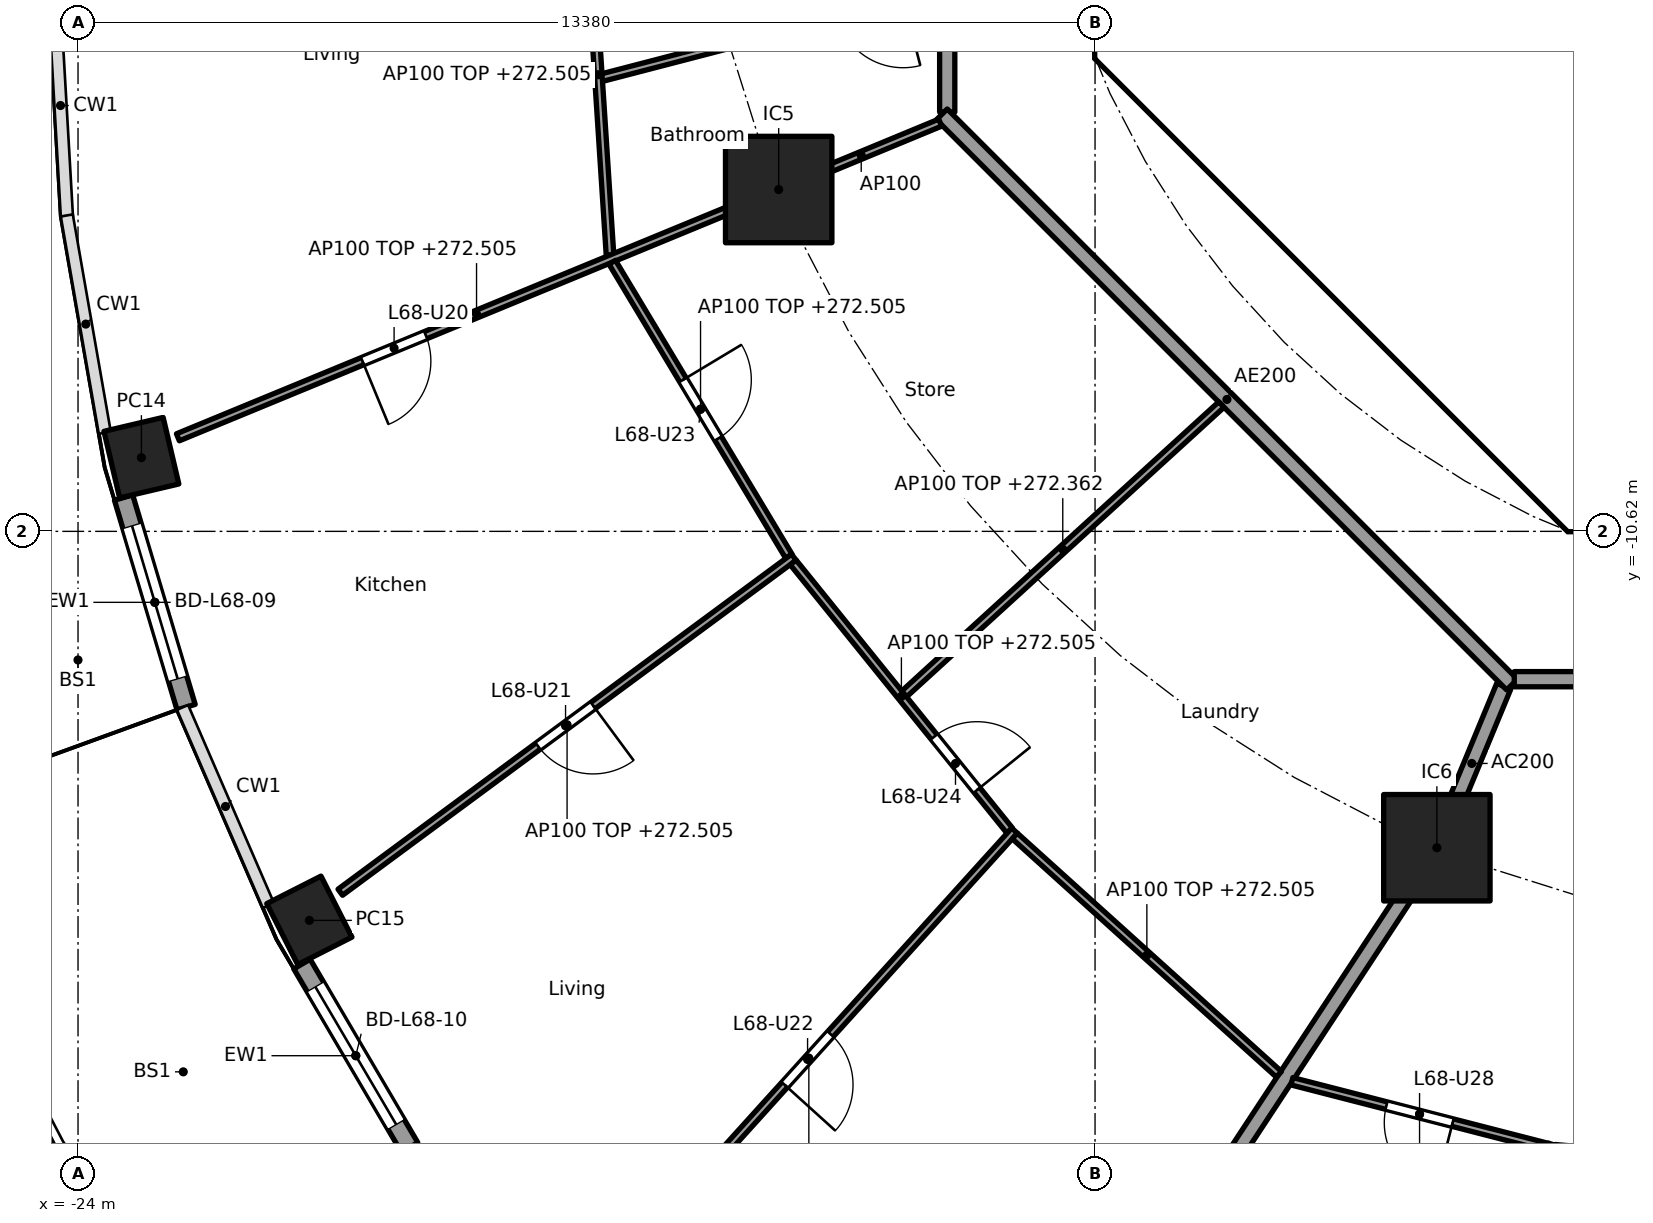
"""IFC4 building model, lengths in metres.
Left out: names, types, materials, properties, quantities, classifications, styles, units other than length and angle.
Written with IfcOpenShell. Run it as: python <this file> out.ifc"""

import sys

from ifc_helpers import new_model, si_unit, direction, frame, frame_2d, origin, origin_2d, place, context, subcontext, project, spatial, polyline, rectangle, hollow_rectangle, outline, extrude, element, fill, save


model = new_model("IFC4")
c1 = context("Model", 3, precision=1e-05, world=origin(), true_north=direction((0.0, 1.0)))
c2 = subcontext(c1, "Body", "Model", "MODEL_VIEW")
j1 = project(units=[si_unit("LENGTHUNIT", "METRE"), si_unit("PLANEANGLEUNIT", "RADIAN")], contexts=[c1])
p1 = place(None, origin())
s1 = spatial("IfcSite", under=j1, at=p1, CompositionType="ELEMENT")
p2 = place(p1, origin())
s2 = spatial("IfcBuilding", under=s1, at=p2, CompositionType="ELEMENT")
p3 = place(p2, frame((0.0, 0.0, 269.6)))
s3 = spatial("IfcBuildingStorey", under=s2, at=p3, CompositionType="ELEMENT", Elevation=269.6)
for number, where, z_axis, x_axis in (
    (1, (-23.166, -9.65, 0.0), (0.0, 0.0, 1.0), (0.229, -0.973, 0.0)),
    (2, (-20.957, -15.738, 0.0), (0.0, 0.0, 1.0), (0.452, -0.892, 0.0)),
):
    element("IfcColumn", number, at=place(p3, frame(where, z_axis=z_axis, x_axis=x_axis)), inside=s3, PredefinedType="COLUMN", context=c2, shape_type="SweptSolid", body=[
        extrude(hollow_rectangle(XDim=0.9, YDim=0.8, WallThickness=0.028, at=origin_2d()), origin(), (0.0, 0.0, 1.0), 3.7),
    ])
for number, where, z_axis, x_axis in (
    (3, (-14.782, -6.123, 0.0), (0.0, 0.0, 1.0), (1.0, 0.0, 0.0)),
    (4, (-6.123, -14.782, 0.0), (0.0, 0.0, 1.0), (1.0, 0.0, 0.0)),
):
    element("IfcColumn", number, at=place(p3, frame(where, z_axis=z_axis, x_axis=x_axis)), inside=s3, PredefinedType="COLUMN", context=c2, shape_type="SweptSolid", body=[
        extrude(rectangle(XDim=1.4, YDim=1.4, at=origin_2d()), origin(), (0.0, 0.0, 1.0), 3.7),
    ])
p4 = place(p3, frame((-22.578, -12.932, 0.0), z_axis=(0.0, 0.0, 1.0), x_axis=(-0.285899456462, 0.958259620768, 0.0)))
e5 = element("IfcWall", 5, at=p4, inside=s3, PredefinedType="SOLIDWALL", context=c2, shape_type="SweptSolid", body=[
    extrude(rectangle(XDim=2.877, YDim=0.25, at=frame_2d((1.438, 0.0))), origin(), (0.0, 0.0, 1.0), 3.44),
])
p5 = place(p4, frame((0.389, 0.0, 0.0)))
e6 = element("IfcOpeningElement", 6, at=p5, cuts=e5, PredefinedType="OPENING", context=c2, shape_type="SweptSolid", body=[
    extrude(rectangle(XDim=2.1, YDim=2.4, at=frame_2d((1.05, 1.2))), frame((0.0, 0.135, 0.0), z_axis=(0.0, -1.0, 0.0), x_axis=(1.0, 0.0, 0.0)), (0.0, 0.0, 1.0), 0.27),
])
p6 = place(p3, frame((-19.638, -18.724, 0.0), z_axis=(0.0, 0.0, 1.0), x_axis=(-0.506371364425, 0.862315511452, 0.0)))
e7 = element("IfcWall", 7, at=p6, inside=s3, PredefinedType="SOLIDWALL", context=c2, shape_type="SweptSolid", body=[
    extrude(rectangle(XDim=2.796, YDim=0.25, at=frame_2d((1.398, 0.0))), origin(), (0.0, 0.0, 1.0), 3.44),
])
p7 = place(p6, frame((0.348, 0.0, 0.0)))
e8 = element("IfcOpeningElement", 8, at=p7, cuts=e7, PredefinedType="OPENING", context=c2, shape_type="SweptSolid", body=[
    extrude(rectangle(XDim=2.1, YDim=2.4, at=frame_2d((1.05, 1.2))), frame((0.0, 0.135, 0.0), z_axis=(0.0, -1.0, 0.0), x_axis=(1.0, 0.0, 0.0)), (0.0, 0.0, 1.0), 0.27),
])
p8 = place(p3, frame((-9.988, -4.613, 0.0), z_axis=(0.0, 0.0, 1.0), x_axis=(0.707106781187, -0.707106781187, 0.0)))
e9 = element("IfcWall", 9, at=p8, inside=s3, PredefinedType="SHEAR", context=c2, shape_type="SweptSolid", body=[
    extrude(rectangle(XDim=7.602, YDim=0.6, at=frame_2d((3.801, 0.0))), origin(), (0.0, 0.0, 1.0), 3.44),
])
p9 = place(p8, frame((6.151, 0.0, 0.0)))
e10 = element("IfcOpeningElement", 10, at=p9, cuts=e9, PredefinedType="OPENING", context=c2, shape_type="SweptSolid", body=[
    extrude(rectangle(XDim=1.1, YDim=2.1, at=frame_2d((0.55, 1.05))), frame((0.0, 0.31, 0.0), z_axis=(0.0, -1.0, 0.0), x_axis=(1.0, 0.0, 0.0)), (0.0, 0.0, 1.0), 0.62),
])
p10 = place(p3, frame((-5.8, -8.227, 0.0), z_axis=(0.0, 0.0, 1.0), x_axis=(0.0, 1.0, 0.0)))
e11 = element("IfcWall", 11, at=p10, inside=s3, PredefinedType="PARTITIONING", context=c2, shape_type="SweptSolid", body=[
    extrude(rectangle(XDim=3.927, YDim=0.15, at=frame_2d((1.963, 0.0))), origin(), (0.0, 0.0, 1.0), 3.44),
])
p11 = place(p10, frame((2.615, 0.0, 0.0)))
e12 = element("IfcOpeningElement", 12, at=p11, cuts=e11, PredefinedType="OPENING", context=c2, shape_type="SweptSolid", body=[
    extrude(rectangle(XDim=0.9, YDim=2.1, at=frame_2d((0.45, 1.05))), frame((0.0, 0.085, 0.0), z_axis=(0.0, -1.0, 0.0), x_axis=(1.0, 0.0, 0.0)), (0.0, 0.0, 1.0), 0.17),
])
p12 = place(p10, frame((0.539, 0.0, 0.0)))
e13 = element("IfcOpeningElement", 13, at=p12, cuts=e11, PredefinedType="OPENING", context=c2, shape_type="SweptSolid", body=[
    extrude(rectangle(XDim=0.9, YDim=2.1, at=frame_2d((0.45, 1.05))), frame((0.0, 0.085, 0.0), z_axis=(0.0, -1.0, 0.0), x_axis=(1.0, 0.0, 0.0)), (0.0, 0.0, 1.0), 0.17),
])
p13 = place(p3, origin())
e14 = element("IfcWall", 14, at=p13, inside=s3, PredefinedType="SHEAR", context=c2, shape_type="SweptSolid", body=[
    extrude(outline(polyline([(-10.625, -3.801), (-10.025, -3.801), (-10.025, -4.152), (-9.776, -4.401), (-10.2, -4.825), (-10.625, -4.401), (-10.625, -3.801)])), origin(), (0.0, 0.0, 1.0), 3.44),
])
p14 = place(p3, origin())
e15 = element("IfcWall", 15, at=p14, inside=s3, PredefinedType="SHEAR", context=c2, shape_type="SweptSolid", body=[
    extrude(outline(polyline([(-4.152, -10.025), (4.152, -10.025), (4.401, -9.776), (4.825, -10.2), (4.401, -10.625), (-4.401, -10.625), (-4.825, -10.2), (-4.401, -9.776), (-4.152, -10.025)])), origin(), (0.0, 0.0, 1.0), 3.44),
])
p15 = place(p3, frame((-8.001, -6.1, 0.0), z_axis=(0.0, 0.0, 1.0), x_axis=(1.0, 0.0, 0.0)))
e16 = element("IfcWall", 16, at=p15, inside=s3, PredefinedType="PARTITIONING", context=c2, shape_type="SweptSolid", body=[
    extrude(rectangle(XDim=2.126, YDim=0.15, at=frame_2d((1.063, 0.0))), origin(), (0.0, 0.0, 1.0), 3.44),
])
p16 = place(p3, frame((-5.243, -12.657, 0.0), z_axis=(0.0, 0.0, 1.0), x_axis=(-0.382770106157, -0.923843626288, 0.0)))
e17 = element("IfcWall", 17, at=p16, inside=s3, PredefinedType="PARTITIONING", context=c2, shape_type="SweptSolid", body=[
    extrude(rectangle(XDim=2.199, YDim=0.2, at=frame_2d((1.1, 0.0))), origin(), (0.0, 0.0, 1.0), 3.44),
])
p17 = place(p3, frame((-6.151, -14.824, 0.0), z_axis=(0.0, 0.0, 1.0), x_axis=(-0.549345577828, -0.835595258556, 0.0)))
e18 = element("IfcWall", 18, at=p17, inside=s3, PredefinedType="PARTITIONING", context=c2, shape_type="SweptSolid", body=[
    extrude(rectangle(XDim=11.62, YDim=0.2, at=frame_2d((5.81, 0.0))), origin(), (0.0, 0.0, 1.0), 2.905),
])
p18 = place(p3, frame((-12.565, 5.304, 0.0), z_axis=(0.0, 0.0, 1.0), x_axis=(0.0, -1.0, 0.0)))
e19 = element("IfcWall", 19, at=p18, inside=s3, PredefinedType="PARTITIONING", context=c2, shape_type="SweptSolid", body=[
    extrude(rectangle(XDim=10.409, YDim=0.2, at=frame_2d((5.205, 0.0))), origin(), (0.0, 0.0, 1.0), 3.44),
])
p19 = place(p18, frame((6.539, 0.0, 0.0)))
e20 = element("IfcOpeningElement", 20, at=p19, cuts=e19, PredefinedType="OPENING", context=c2, shape_type="SweptSolid", body=[
    extrude(rectangle(XDim=1.0, YDim=2.1, at=frame_2d((0.5, 1.05))), frame((0.0, 0.11, 0.0), z_axis=(0.0, -1.0, 0.0), x_axis=(1.0, 0.0, 0.0)), (0.0, 0.0, 1.0), 0.22),
])
p20 = place(p3, frame((-12.635, -5.134, 0.0), z_axis=(0.0, 0.0, 1.0), x_axis=(0.707106781187, -0.707106781187, 0.0)))
e21 = element("IfcWall", 21, at=p20, inside=s3, PredefinedType="PARTITIONING", context=c2, shape_type="SweptSolid", body=[
    extrude(rectangle(XDim=10.609, YDim=0.2, at=frame_2d((5.305, 0.0))), origin(), (0.0, 0.0, 1.0), 3.44),
])
p21 = place(p3, frame((-5.104, -12.565, 0.0), z_axis=(0.0, 0.0, 1.0), x_axis=(1.0, 0.0, 0.0)))
e22 = element("IfcWall", 22, at=p21, inside=s3, PredefinedType="PARTITIONING", context=c2, shape_type="SweptSolid", body=[
    extrude(rectangle(XDim=10.409, YDim=0.2, at=frame_2d((5.205, 0.0))), origin(), (0.0, 0.0, 1.0), 3.44),
])
p22 = place(p21, frame((5.906, 0.0, 0.0)))
e23 = element("IfcOpeningElement", 23, at=p22, cuts=e22, PredefinedType="OPENING", context=c2, shape_type="SweptSolid", body=[
    extrude(rectangle(XDim=1.0, YDim=2.1, at=frame_2d((0.5, 1.05))), frame((0.0, 0.11, 0.0), z_axis=(0.0, -1.0, 0.0), x_axis=(1.0, 0.0, 0.0)), (0.0, 0.0, 1.0), 0.22),
])
p23 = place(p3, frame((-17.31, -2.238, 0.0), z_axis=(0.0, 0.0, 1.0), x_axis=(0.064949202176, -0.997888571503, 0.0)))
e24 = element("IfcWall", 24, at=p23, inside=s3, PredefinedType="PARTITIONING", context=c2, shape_type="SweptSolid", body=[
    extrude(rectangle(XDim=4.759, YDim=0.1, at=frame_2d((2.379, 0.0))), origin(), (0.0, 0.0, 1.0), 2.905),
])
p24 = place(p23, frame((0.79, 0.0, 0.0)))
e25 = element("IfcOpeningElement", 25, at=p24, cuts=e24, PredefinedType="OPENING", context=c2, shape_type="SweptSolid", body=[
    extrude(rectangle(XDim=0.9, YDim=2.1, at=frame_2d((0.45, 1.05))), frame((0.0, 0.06, 0.0), z_axis=(0.0, -1.0, 0.0), x_axis=(1.0, 0.0, 0.0)), (0.0, 0.0, 1.0), 0.12),
])
p25 = place(p3, frame((-12.662, -3.495, 0.0), z_axis=(0.0, 0.0, 1.0), x_axis=(-0.967834941053, -0.251586022817, 0.0)))
e26 = element("IfcWall", 26, at=p25, inside=s3, PredefinedType="PARTITIONING", context=c2, shape_type="SweptSolid", body=[
    extrude(rectangle(XDim=4.59, YDim=0.1, at=frame_2d((2.295, 0.0))), origin(), (0.0, 0.0, 1.0), 2.762),
])
p26 = place(p25, frame((0.5, 0.0, 0.0)))
e27 = element("IfcOpeningElement", 27, at=p26, cuts=e26, PredefinedType="OPENING", context=c2, shape_type="SweptSolid", body=[
    extrude(rectangle(XDim=0.9, YDim=2.1, at=frame_2d((0.45, 1.05))), frame((0.0, 0.06, 0.0), z_axis=(0.0, -1.0, 0.0), x_axis=(1.0, 0.0, 0.0)), (0.0, 0.0, 1.0), 0.12),
])
p27 = place(p3, frame((-12.657, -5.243, 0.0), z_axis=(0.0, 0.0, 1.0), x_axis=(-0.923871314276, -0.382703272338, 0.0)))
e28 = element("IfcWall", 28, at=p27, inside=s3, PredefinedType="PARTITIONING", context=c2, shape_type="SweptSolid", body=[
    extrude(rectangle(XDim=2.249, YDim=0.1, at=frame_2d((1.125, 0.0))), origin(), (0.0, 0.0, 1.0), 3.44),
])
p28 = place(p3, frame((-14.828, -6.142, 0.0), z_axis=(0.0, 0.0, 1.0), x_axis=(-0.924478087429, -0.381235184451, 0.0)))
e29 = element("IfcWall", 29, at=p28, inside=s3, PredefinedType="PARTITIONING", context=c2, shape_type="SweptSolid", body=[
    extrude(rectangle(XDim=8.499, YDim=0.1, at=frame_2d((4.25, 0.0))), origin(), (0.0, 0.0, 1.0), 2.905),
])
p29 = place(p28, frame((4.973, 0.0, 0.0)))
e30 = element("IfcOpeningElement", 30, at=p29, cuts=e29, PredefinedType="OPENING", context=c2, shape_type="SweptSolid", body=[
    extrude(rectangle(XDim=0.9, YDim=2.1, at=frame_2d((0.45, 1.05))), frame((0.0, 0.06, 0.0), z_axis=(0.0, -1.0, 0.0), x_axis=(1.0, 0.0, 0.0)), (0.0, 0.0, 1.0), 0.12),
])
p30 = place(p3, frame((-16.972, -7.08, 0.0), z_axis=(0.0, 0.0, 1.0), x_axis=(0.514989049311, -0.857196756346, 0.0)))
e31 = element("IfcWall", 31, at=p30, inside=s3, PredefinedType="PARTITIONING", context=c2, shape_type="SweptSolid", body=[
    extrude(rectangle(XDim=4.512, YDim=0.1, at=frame_2d((2.256, 0.0))), origin(), (0.0, 0.0, 1.0), 2.905),
])
p31 = place(p30, frame((1.806, 0.0, 0.0)))
e32 = element("IfcOpeningElement", 32, at=p31, cuts=e31, PredefinedType="OPENING", context=c2, shape_type="SweptSolid", body=[
    extrude(rectangle(XDim=0.9, YDim=2.1, at=frame_2d((0.45, 1.05))), frame((0.0, 0.06, 0.0), z_axis=(0.0, -1.0, 0.0), x_axis=(1.0, 0.0, 0.0)), (0.0, 0.0, 1.0), 0.12),
])
p32 = place(p3, frame((-14.582, -10.96, 0.0), z_axis=(0.0, 0.0, 1.0), x_axis=(-0.804405200554, -0.594081032623, 0.0)))
e33 = element("IfcWall", 33, at=p32, inside=s3, PredefinedType="PARTITIONING", context=c2, shape_type="SweptSolid", body=[
    extrude(rectangle(XDim=7.418, YDim=0.1, at=frame_2d((3.709, 0.0))), origin(), (0.0, 0.0, 1.0), 2.905),
])
p33 = place(p32, frame((3.284, 0.0, 0.0)))
e34 = element("IfcOpeningElement", 34, at=p33, cuts=e33, PredefinedType="OPENING", context=c2, shape_type="SweptSolid", body=[
    extrude(rectangle(XDim=0.9, YDim=2.1, at=frame_2d((0.45, 1.05))), frame((0.0, 0.06, 0.0), z_axis=(0.0, -1.0, 0.0), x_axis=(1.0, 0.0, 0.0)), (0.0, 0.0, 1.0), 0.12),
])
p34 = place(p3, frame((-14.591, -11.029, 0.0), z_axis=(0.0, 0.0, 1.0), x_axis=(0.628170338674, -0.778075848237, 0.0)))
e35 = element("IfcWall", 35, at=p34, inside=s3, PredefinedType="PARTITIONING", context=c2, shape_type="SweptSolid", body=[
    extrude(rectangle(XDim=4.532, YDim=0.1, at=frame_2d((2.266, 0.0))), origin(), (0.0, 0.0, 1.0), 2.905),
])
p35 = place(p34, frame((2.949, 0.0, 0.0)))
e36 = element("IfcOpeningElement", 36, at=p35, cuts=e35, PredefinedType="OPENING", context=c2, shape_type="SweptSolid", body=[
    extrude(rectangle(XDim=0.9, YDim=2.1, at=frame_2d((0.45, 1.05))), frame((0.0, 0.06, 0.0), z_axis=(0.0, -1.0, 0.0), x_axis=(1.0, 0.0, 0.0)), (0.0, 0.0, 1.0), 0.12),
])
p36 = place(p3, frame((-8.958, -8.952, 0.0), z_axis=(0.0, 0.0, 1.0), x_axis=(-0.73876526954, -0.673962815385, 0.0)))
e37 = element("IfcWall", 37, at=p36, inside=s3, PredefinedType="PARTITIONING", context=c2, shape_type="SweptSolid", body=[
    extrude(rectangle(XDim=5.647, YDim=0.1, at=frame_2d((2.824, 0.0))), origin(), (0.0, 0.0, 1.0), 2.762),
])
p37 = place(p3, frame((-11.679, -14.557, 0.0), z_axis=(0.0, 0.0, 1.0), x_axis=(-0.670800011545, -0.741638284146, 0.0)))
e38 = element("IfcWall", 38, at=p37, inside=s3, PredefinedType="PARTITIONING", context=c2, shape_type="SweptSolid", body=[
    extrude(rectangle(XDim=8.068, YDim=0.1, at=frame_2d((4.034, 0.0))), origin(), (0.0, 0.0, 1.0), 2.905),
])
p38 = place(p37, frame((3.609, 0.0, 0.0)))
e39 = element("IfcOpeningElement", 39, at=p38, cuts=e38, PredefinedType="OPENING", context=c2, shape_type="SweptSolid", body=[
    extrude(rectangle(XDim=0.9, YDim=2.1, at=frame_2d((0.45, 1.05))), frame((0.0, 0.06, 0.0), z_axis=(0.0, -1.0, 0.0), x_axis=(1.0, 0.0, 0.0)), (0.0, 0.0, 1.0), 0.12),
])
p39 = place(p3, frame((-11.676, -14.628, 0.0), z_axis=(0.0, 0.0, 1.0), x_axis=(0.74245829867, -0.669892285921, 0.0)))
e40 = element("IfcWall", 40, at=p39, inside=s3, PredefinedType="PARTITIONING", context=c2, shape_type="SweptSolid", body=[
    extrude(rectangle(XDim=4.68, YDim=0.1, at=frame_2d((2.34, 0.0))), origin(), (0.0, 0.0, 1.0), 2.905),
])
p40 = place(p3, frame((-8.03, -17.854, 0.0), z_axis=(0.0, 0.0, 1.0), x_axis=(0.968441967324, -0.249239154077, 0.0)))
e41 = element("IfcWall", 41, at=p40, inside=s3, PredefinedType="PARTITIONING", context=c2, shape_type="SweptSolid", body=[
    extrude(rectangle(XDim=3.468, YDim=0.1, at=frame_2d((1.734, 0.0))), origin(), (0.0, 0.0, 1.0), 2.905),
])
p41 = place(p40, frame((1.284, 0.0, 0.0)))
e42 = element("IfcOpeningElement", 42, at=p41, cuts=e41, PredefinedType="OPENING", context=c2, shape_type="SweptSolid", body=[
    extrude(rectangle(XDim=0.9, YDim=2.1, at=frame_2d((0.45, 1.05))), frame((0.0, 0.06, 0.0), z_axis=(0.0, -1.0, 0.0), x_axis=(1.0, 0.0, 0.0)), (0.0, 0.0, 1.0), 0.12),
])
p42 = place(p3, frame((-4.608, -18.684, 0.0), z_axis=(0.0, 0.0, 1.0), x_axis=(-0.311419102378, -0.95027266754, 0.0)))
e43 = element("IfcWall", 43, at=p42, inside=s3, PredefinedType="PARTITIONING", context=c2, shape_type="SweptSolid", body=[
    extrude(rectangle(XDim=8.735, YDim=0.1, at=frame_2d((4.367, 0.0))), origin(), (0.0, 0.0, 1.0), 2.905),
])
p43 = place(p42, frame((3.942, 0.0, 0.0)))
e44 = element("IfcOpeningElement", 44, at=p43, cuts=e43, PredefinedType="OPENING", context=c2, shape_type="SweptSolid", body=[
    extrude(rectangle(XDim=0.9, YDim=2.1, at=frame_2d((0.45, 1.05))), frame((0.0, 0.06, 0.0), z_axis=(0.0, -1.0, 0.0), x_axis=(1.0, 0.0, 0.0)), (0.0, 0.0, 1.0), 0.12),
])
p44 = place(p5, origin())
e45 = element("IfcDoor", 45, at=p44, inside=s3, OperationType="SLIDING_TO_LEFT", PredefinedType="DOOR", context=c2, shape_type="SweptSolid", body=[
    extrude(rectangle(XDim=2.1, YDim=2.4, at=frame_2d((1.05, 1.2))), frame((0.0, 0.025, 0.0), z_axis=(0.0, -1.0, 0.0), x_axis=(1.0, 0.0, 0.0)), (0.0, 0.0, 1.0), 0.05),
])
fill(e6, e45)
p45 = place(p7, origin())
e46 = element("IfcDoor", 46, at=p45, inside=s3, OperationType="SLIDING_TO_LEFT", PredefinedType="DOOR", context=c2, shape_type="SweptSolid", body=[
    extrude(rectangle(XDim=2.1, YDim=2.4, at=frame_2d((1.05, 1.2))), frame((0.0, 0.025, 0.0), z_axis=(0.0, -1.0, 0.0), x_axis=(1.0, 0.0, 0.0)), (0.0, 0.0, 1.0), 0.05),
])
fill(e8, e46)
p46 = place(p11, origin())
e47 = element("IfcDoor", 47, at=p46, inside=s3, OperationType="SINGLE_SWING_LEFT", PredefinedType="DOOR", context=c2, shape_type="SweptSolid", body=[
    extrude(rectangle(XDim=0.9, YDim=2.1, at=frame_2d((0.45, 1.05))), frame((0.0, 0.025, 0.0), z_axis=(0.0, -1.0, 0.0), x_axis=(1.0, 0.0, 0.0)), (0.0, 0.0, 1.0), 0.05),
])
fill(e12, e47)
p47 = place(p12, origin())
e48 = element("IfcDoor", 48, at=p47, inside=s3, OperationType="SINGLE_SWING_LEFT", PredefinedType="DOOR", context=c2, shape_type="SweptSolid", body=[
    extrude(rectangle(XDim=0.9, YDim=2.1, at=frame_2d((0.45, 1.05))), frame((0.0, 0.025, 0.0), z_axis=(0.0, -1.0, 0.0), x_axis=(1.0, 0.0, 0.0)), (0.0, 0.0, 1.0), 0.05),
])
fill(e13, e48)
p48 = place(p9, origin())
e49 = element("IfcDoor", 49, at=p48, inside=s3, OperationType="SINGLE_SWING_RIGHT", PredefinedType="DOOR", context=c2, shape_type="SweptSolid", body=[
    extrude(rectangle(XDim=1.1, YDim=2.1, at=frame_2d((0.55, 1.05))), frame((0.0, 0.025, 0.0), z_axis=(0.0, -1.0, 0.0), x_axis=(1.0, 0.0, 0.0)), (0.0, 0.0, 1.0), 0.05),
])
fill(e10, e49)
p49 = place(p29, origin())
e50 = element("IfcDoor", 50, at=p49, inside=s3, OperationType="SINGLE_SWING_RIGHT", PredefinedType="DOOR", context=c2, shape_type="SweptSolid", body=[
    extrude(rectangle(XDim=0.9, YDim=2.1, at=frame_2d((0.45, 1.05))), frame((0.0, 0.025, 0.0), z_axis=(0.0, -1.0, 0.0), x_axis=(1.0, 0.0, 0.0)), (0.0, 0.0, 1.0), 0.05),
])
fill(e30, e50)
p50 = place(p33, origin())
e51 = element("IfcDoor", 51, at=p50, inside=s3, OperationType="SINGLE_SWING_LEFT", PredefinedType="DOOR", context=c2, shape_type="SweptSolid", body=[
    extrude(rectangle(XDim=0.9, YDim=2.1, at=frame_2d((0.45, 1.05))), frame((0.0, 0.025, 0.0), z_axis=(0.0, -1.0, 0.0), x_axis=(1.0, 0.0, 0.0)), (0.0, 0.0, 1.0), 0.05),
])
fill(e34, e51)
p51 = place(p38, origin())
e52 = element("IfcDoor", 52, at=p51, inside=s3, OperationType="SINGLE_SWING_RIGHT", PredefinedType="DOOR", context=c2, shape_type="SweptSolid", body=[
    extrude(rectangle(XDim=0.9, YDim=2.1, at=frame_2d((0.45, 1.05))), frame((0.0, 0.025, 0.0), z_axis=(0.0, -1.0, 0.0), x_axis=(1.0, 0.0, 0.0)), (0.0, 0.0, 1.0), 0.05),
])
fill(e39, e52)
p52 = place(p31, origin())
e53 = element("IfcDoor", 53, at=p52, inside=s3, OperationType="SINGLE_SWING_LEFT", PredefinedType="DOOR", context=c2, shape_type="SweptSolid", body=[
    extrude(rectangle(XDim=0.9, YDim=2.1, at=frame_2d((0.45, 1.05))), frame((0.0, 0.025, 0.0), z_axis=(0.0, -1.0, 0.0), x_axis=(1.0, 0.0, 0.0)), (0.0, 0.0, 1.0), 0.05),
])
fill(e32, e53)
p53 = place(p35, origin())
e54 = element("IfcDoor", 54, at=p53, inside=s3, OperationType="SINGLE_SWING_RIGHT", PredefinedType="DOOR", context=c2, shape_type="SweptSolid", body=[
    extrude(rectangle(XDim=0.9, YDim=2.1, at=frame_2d((0.45, 1.05))), frame((0.0, 0.025, 0.0), z_axis=(0.0, -1.0, 0.0), x_axis=(1.0, 0.0, 0.0)), (0.0, 0.0, 1.0), 0.05),
])
fill(e36, e54)
p54 = place(p41, frame((0.9, 0.0, 0.0), x_axis=(-1.0, 0.0, 0.0)))
e55 = element("IfcDoor", 55, at=p54, inside=s3, OperationType="SINGLE_SWING_LEFT", PredefinedType="DOOR", context=c2, shape_type="SweptSolid", body=[
    extrude(rectangle(XDim=0.9, YDim=2.1, at=frame_2d((0.45, 1.05))), frame((0.0, 0.025, 0.0), z_axis=(0.0, -1.0, 0.0), x_axis=(1.0, 0.0, 0.0)), (0.0, 0.0, 1.0), 0.05),
])
fill(e42, e55)
save(model, sys.argv[1])
